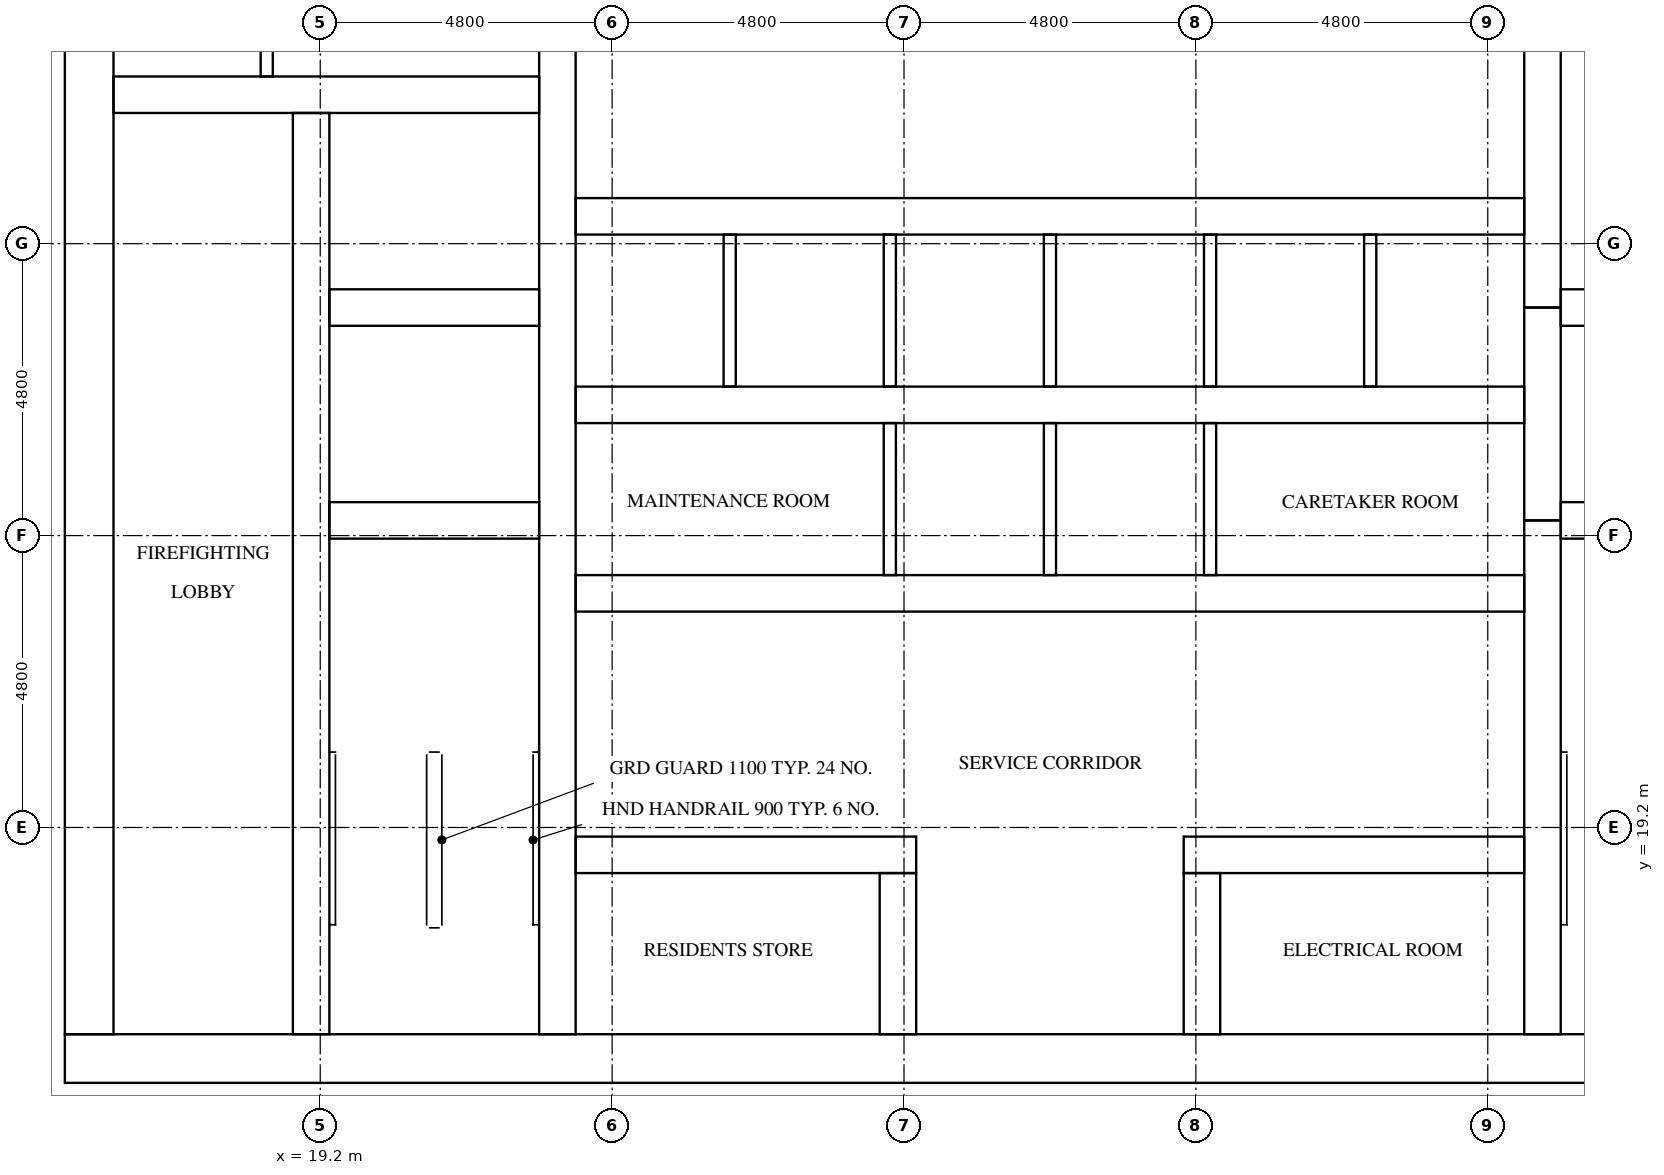
"""IFC4 building model, lengths in metres.
Left out: names, types, materials, properties, quantities, classifications, styles, units other than length and angle.
Written with IfcOpenShell. Run it as: python <this file> out.ifc"""

import sys

from ifc_helpers import new_model, si_unit, direction, frame, frame_2d, origin, place, context, subcontext, project, spatial, rectangle, extrude, element, fill, save


model = new_model("IFC4")
c1 = context("Model", 3, precision=1e-05, world=origin(), true_north=direction((0.0, 1.0)))
c2 = subcontext(c1, "Body", "Model", "MODEL_VIEW")
j1 = project(units=[si_unit("LENGTHUNIT", "METRE"), si_unit("PLANEANGLEUNIT", "RADIAN")], contexts=[c1])
p1 = place(None, origin())
s1 = spatial("IfcSite", under=j1, at=p1, CompositionType="ELEMENT")
p2 = place(p1, origin())
s2 = spatial("IfcBuilding", under=s1, at=p2, CompositionType="ELEMENT")
p3 = place(p2, frame((0.0, 0.0, 152.5)))
s3 = spatial("IfcBuildingStorey", under=s2, at=p3, CompositionType="ELEMENT", Elevation=152.5)
p4 = place(p3, frame((15.0, 15.4, 0.0), z_axis=(0.0, 0.0, 1.0), x_axis=(1.0, 0.0, 0.0)))
e1 = element("IfcWall", 1, at=p4, inside=s3, PredefinedType="SHEAR", context=c2, shape_type="SweptSolid", body=[
    extrude(rectangle(XDim=32.4, YDim=0.8, at=frame_2d((16.2, 0.0))), origin(), (0.0, 0.0, 1.0), 3.2),
])
p5 = place(p4, frame((15.3, 0.0, 0.0)))
e2 = element("IfcOpeningElement", 2, at=p5, cuts=e1, PredefinedType="OPENING", context=c2, shape_type="SweptSolid", body=[
    extrude(rectangle(XDim=1.8, YDim=2.1, at=frame_2d((0.9, 1.05))), frame((0.0, 0.41, 0.0), z_axis=(0.0, -1.0, 0.0), x_axis=(1.0, 0.0, 0.0)), (0.0, 0.0, 1.0), 0.82),
])
p6 = place(p3, frame((15.4, 15.8, 0.0), z_axis=(0.0, 0.0, 1.0), x_axis=(0.0, 1.0, 0.0)))
e3 = element("IfcWall", 3, at=p6, inside=s3, PredefinedType="SHEAR", context=c2, shape_type="SweptSolid", body=[
    extrude(rectangle(XDim=21.2, YDim=0.8, at=frame_2d((10.6, 0.0))), origin(), (0.0, 0.0, 1.0), 3.2),
])
p7 = place(p6, frame((4.96, 0.0, 0.0)))
e4 = element("IfcOpeningElement", 4, at=p7, cuts=e3, PredefinedType="OPENING", context=c2, shape_type="SweptSolid", body=[
    extrude(rectangle(XDim=1.2, YDim=2.1, at=frame_2d((0.6, 1.05))), frame((0.0, 0.41, 0.0), z_axis=(0.0, -1.0, 0.0), x_axis=(1.0, 0.0, 0.0)), (0.0, 0.0, 1.0), 0.82),
])
p8 = place(p3, frame((19.05, 15.8, 0.0), z_axis=(0.0, 0.0, 1.0), x_axis=(0.0, 1.0, 0.0)))
e5 = element("IfcWall", 5, at=p8, inside=s3, PredefinedType="SHEAR", context=c2, shape_type="SweptSolid", body=[
    extrude(rectangle(XDim=15.15, YDim=0.6, at=frame_2d((7.575, 0.0))), origin(), (0.0, 0.0, 1.0), 3.2),
])
p9 = place(p8, frame((9.65, 0.0, 0.0)))
e6 = element("IfcOpeningElement", 6, at=p9, cuts=e5, PredefinedType="OPENING", context=c2, shape_type="SweptSolid", body=[
    extrude(rectangle(XDim=1.1, YDim=2.1, at=frame_2d((0.55, 1.05))), frame((0.0, 0.31, 0.0), z_axis=(0.0, -1.0, 0.0), x_axis=(1.0, 0.0, 0.0)), (0.0, 0.0, 1.0), 0.62),
])
p10 = place(p8, frame((13.15, 0.0, 0.0)))
e7 = element("IfcOpeningElement", 7, at=p10, cuts=e5, PredefinedType="OPENING", context=c2, shape_type="SweptSolid", body=[
    extrude(rectangle(XDim=1.1, YDim=2.1, at=frame_2d((0.55, 1.05))), frame((0.0, 0.31, 0.0), z_axis=(0.0, -1.0, 0.0), x_axis=(1.0, 0.0, 0.0)), (0.0, 0.0, 1.0), 0.62),
])
p11 = place(p8, frame((0.4, 0.0, 0.0)))
e8 = element("IfcOpeningElement", 8, at=p11, cuts=e5, PredefinedType="OPENING", context=c2, shape_type="SweptSolid", body=[
    extrude(rectangle(XDim=1.2, YDim=2.1, at=frame_2d((0.6, 1.05))), frame((0.0, 0.31, 0.0), z_axis=(0.0, -1.0, 0.0), x_axis=(1.0, 0.0, 0.0)), (0.0, 0.0, 1.0), 0.62),
])
p12 = place(p3, frame((23.1, 15.8, 0.0), z_axis=(0.0, 0.0, 1.0), x_axis=(0.0, 1.0, 0.0)))
e9 = element("IfcWall", 9, at=p12, inside=s3, PredefinedType="SHEAR", context=c2, shape_type="SweptSolid", body=[
    extrude(rectangle(XDim=21.2, YDim=0.6, at=frame_2d((10.6, 0.0))), origin(), (0.0, 0.0, 1.0), 3.2),
])
p13 = place(p3, frame((39.3, 15.8, 0.0), z_axis=(0.0, 0.0, 1.0), x_axis=(0.0, 1.0, 0.0)))
e10 = element("IfcWall", 10, at=p13, inside=s3, PredefinedType="SHEAR", context=c2, shape_type="SweptSolid", body=[
    extrude(rectangle(XDim=8.45, YDim=0.6, at=frame_2d((4.225, 0.0))), origin(), (0.0, 0.0, 1.0), 3.2),
])
p14 = place(p3, frame((39.3, 24.25, 0.0), z_axis=(0.0, 0.0, 1.0), x_axis=(0.0, 1.0, 0.0)))
e11 = element("IfcWall", 11, at=p14, inside=s3, PredefinedType="SHEAR", context=c2, shape_type="SweptSolid", body=[
    extrude(rectangle(XDim=3.5, YDim=0.6, at=frame_2d((1.75, 0.0))), origin(), (0.0, 0.0, 1.0), 3.2),
])
p15 = place(p3, frame((39.3, 27.75, 0.0), z_axis=(0.0, 0.0, 1.0), x_axis=(0.0, 1.0, 0.0)))
e12 = element("IfcWall", 12, at=p15, inside=s3, PredefinedType="SHEAR", context=c2, shape_type="SweptSolid", body=[
    extrude(rectangle(XDim=9.25, YDim=0.6, at=frame_2d((4.625, 0.0))), origin(), (0.0, 0.0, 1.0), 3.2),
])
for number, where, z_axis, x_axis in (
    (13, (19.35, 24.25, 0.0), (0.0, 0.0, 1.0), (1.0, 0.0, 0.0)),
    (14, (19.35, 27.75, 0.0), (0.0, 0.0, 1.0), (1.0, 0.0, 0.0)),
):
    element("IfcWall", number, at=place(p3, frame(where, z_axis=z_axis, x_axis=x_axis)), inside=s3, PredefinedType="SHEAR", context=c2, shape_type="SweptSolid", body=[
        extrude(rectangle(XDim=3.45, YDim=0.6, at=frame_2d((1.725, 0.0))), origin(), (0.0, 0.0, 1.0), 3.2),
    ])
p16 = place(p3, frame((15.8, 31.25, 0.0), z_axis=(0.0, 0.0, 1.0), x_axis=(1.0, 0.0, 0.0)))
e15 = element("IfcWall", 15, at=p16, inside=s3, PredefinedType="SHEAR", context=c2, shape_type="SweptSolid", body=[
    extrude(rectangle(XDim=7.0, YDim=0.6, at=frame_2d((3.5, 0.0))), origin(), (0.0, 0.0, 1.0), 3.2),
])
for number, where, z_axis, x_axis in (
    (16, (39.6, 24.25, 0.0), (0.0, 0.0, 1.0), (1.0, 0.0, 0.0)),
    (17, (39.6, 27.75, 0.0), (0.0, 0.0, 1.0), (1.0, 0.0, 0.0)),
):
    element("IfcWall", number, at=place(p3, frame(where, z_axis=z_axis, x_axis=x_axis)), inside=s3, PredefinedType="SHEAR", context=c2, shape_type="SweptSolid", body=[
        extrude(rectangle(XDim=3.45, YDim=0.6, at=frame_2d((1.725, 0.0))), origin(), (0.0, 0.0, 1.0), 3.2),
    ])
p17 = place(p3, frame((23.4, 18.75, 0.0), z_axis=(0.0, 0.0, 1.0), x_axis=(1.0, 0.0, 0.0)))
e18 = element("IfcWall", 18, at=p17, inside=s3, PredefinedType="SHEAR", context=c2, shape_type="SweptSolid", body=[
    extrude(rectangle(XDim=5.6, YDim=0.6, at=frame_2d((2.8, 0.0))), origin(), (0.0, 0.0, 1.0), 3.2),
])
p18 = place(p17, frame((2.0, 0.0, 0.0)))
e19 = element("IfcOpeningElement", 19, at=p18, cuts=e18, PredefinedType="OPENING", context=c2, shape_type="SweptSolid", body=[
    extrude(rectangle(XDim=1.0, YDim=2.1, at=frame_2d((0.5, 1.05))), frame((0.0, 0.31, 0.0), z_axis=(0.0, -1.0, 0.0), x_axis=(1.0, 0.0, 0.0)), (0.0, 0.0, 1.0), 0.62),
])
p19 = place(p3, frame((33.4, 18.75, 0.0), z_axis=(0.0, 0.0, 1.0), x_axis=(1.0, 0.0, 0.0)))
e20 = element("IfcWall", 20, at=p19, inside=s3, PredefinedType="SHEAR", context=c2, shape_type="SweptSolid", body=[
    extrude(rectangle(XDim=5.6, YDim=0.6, at=frame_2d((2.8, 0.0))), origin(), (0.0, 0.0, 1.0), 3.2),
])
p20 = place(p19, frame((2.6, 0.0, 0.0)))
e21 = element("IfcOpeningElement", 21, at=p20, cuts=e20, PredefinedType="OPENING", context=c2, shape_type="SweptSolid", body=[
    extrude(rectangle(XDim=1.0, YDim=2.1, at=frame_2d((0.5, 1.05))), frame((0.0, 0.31, 0.0), z_axis=(0.0, -1.0, 0.0), x_axis=(1.0, 0.0, 0.0)), (0.0, 0.0, 1.0), 0.62),
])
p21 = place(p3, frame((23.4, 23.05, 0.0), z_axis=(0.0, 0.0, 1.0), x_axis=(1.0, 0.0, 0.0)))
e22 = element("IfcWall", 22, at=p21, inside=s3, PredefinedType="SHEAR", context=c2, shape_type="SweptSolid", body=[
    extrude(rectangle(XDim=15.6, YDim=0.6, at=frame_2d((7.8, 0.0))), origin(), (0.0, 0.0, 1.0), 3.2),
])
p22 = place(p21, frame((2.033, 0.0, 0.0)))
e23 = element("IfcOpeningElement", 23, at=p22, cuts=e22, PredefinedType="OPENING", context=c2, shape_type="SweptSolid", body=[
    extrude(rectangle(XDim=1.0, YDim=2.1, at=frame_2d((0.5, 1.05))), frame((0.0, 0.31, 0.0), z_axis=(0.0, -1.0, 0.0), x_axis=(1.0, 0.0, 0.0)), (0.0, 0.0, 1.0), 0.62),
])
p23 = place(p21, frame((12.567, 0.0, 0.0)))
e24 = element("IfcOpeningElement", 24, at=p23, cuts=e22, PredefinedType="OPENING", context=c2, shape_type="SweptSolid", body=[
    extrude(rectangle(XDim=1.0, YDim=2.1, at=frame_2d((0.5, 1.05))), frame((0.0, 0.31, 0.0), z_axis=(0.0, -1.0, 0.0), x_axis=(1.0, 0.0, 0.0)), (0.0, 0.0, 1.0), 0.62),
])
p24 = place(p3, frame((23.4, 26.15, 0.0), z_axis=(0.0, 0.0, 1.0), x_axis=(1.0, 0.0, 0.0)))
e25 = element("IfcWall", 25, at=p24, inside=s3, PredefinedType="SHEAR", context=c2, shape_type="SweptSolid", body=[
    extrude(rectangle(XDim=15.6, YDim=0.6, at=frame_2d((7.8, 0.0))), origin(), (0.0, 0.0, 1.0), 3.2),
])
p25 = place(p3, frame((23.4, 29.25, 0.0), z_axis=(0.0, 0.0, 1.0), x_axis=(1.0, 0.0, 0.0)))
e26 = element("IfcWall", 26, at=p25, inside=s3, PredefinedType="SHEAR", context=c2, shape_type="SweptSolid", body=[
    extrude(rectangle(XDim=15.6, YDim=0.6, at=frame_2d((7.8, 0.0))), origin(), (0.0, 0.0, 1.0), 3.2),
])
p26 = place(p25, frame((0.667, 0.0, 0.0)))
e27 = element("IfcOpeningElement", 27, at=p26, cuts=e26, PredefinedType="OPENING", context=c2, shape_type="SweptSolid", body=[
    extrude(rectangle(XDim=1.1, YDim=2.1, at=frame_2d((0.55, 1.05))), frame((0.0, 0.31, 0.0), z_axis=(0.0, -1.0, 0.0), x_axis=(1.0, 0.0, 0.0)), (0.0, 0.0, 1.0), 0.62),
])
p27 = place(p25, frame((3.3, 0.0, 0.0)))
e28 = element("IfcOpeningElement", 28, at=p27, cuts=e26, PredefinedType="OPENING", context=c2, shape_type="SweptSolid", body=[
    extrude(rectangle(XDim=1.1, YDim=2.1, at=frame_2d((0.55, 1.05))), frame((0.0, 0.31, 0.0), z_axis=(0.0, -1.0, 0.0), x_axis=(1.0, 0.0, 0.0)), (0.0, 0.0, 1.0), 0.62),
])
p28 = place(p25, frame((5.933, 0.0, 0.0)))
e29 = element("IfcOpeningElement", 29, at=p28, cuts=e26, PredefinedType="OPENING", context=c2, shape_type="SweptSolid", body=[
    extrude(rectangle(XDim=1.1, YDim=2.1, at=frame_2d((0.55, 1.05))), frame((0.0, 0.31, 0.0), z_axis=(0.0, -1.0, 0.0), x_axis=(1.0, 0.0, 0.0)), (0.0, 0.0, 1.0), 0.62),
])
p29 = place(p25, frame((8.567, 0.0, 0.0)))
e30 = element("IfcOpeningElement", 30, at=p29, cuts=e26, PredefinedType="OPENING", context=c2, shape_type="SweptSolid", body=[
    extrude(rectangle(XDim=1.1, YDim=2.1, at=frame_2d((0.55, 1.05))), frame((0.0, 0.31, 0.0), z_axis=(0.0, -1.0, 0.0), x_axis=(1.0, 0.0, 0.0)), (0.0, 0.0, 1.0), 0.62),
])
p30 = place(p25, frame((11.2, 0.0, 0.0)))
e31 = element("IfcOpeningElement", 31, at=p30, cuts=e26, PredefinedType="OPENING", context=c2, shape_type="SweptSolid", body=[
    extrude(rectangle(XDim=1.1, YDim=2.1, at=frame_2d((0.55, 1.05))), frame((0.0, 0.31, 0.0), z_axis=(0.0, -1.0, 0.0), x_axis=(1.0, 0.0, 0.0)), (0.0, 0.0, 1.0), 0.62),
])
p31 = place(p25, frame((13.833, 0.0, 0.0)))
e32 = element("IfcOpeningElement", 32, at=p31, cuts=e26, PredefinedType="OPENING", context=c2, shape_type="SweptSolid", body=[
    extrude(rectangle(XDim=1.1, YDim=2.1, at=frame_2d((0.55, 1.05))), frame((0.0, 0.31, 0.0), z_axis=(0.0, -1.0, 0.0), x_axis=(1.0, 0.0, 0.0)), (0.0, 0.0, 1.0), 0.62),
])
for number, where, z_axis, x_axis in (
    (33, (28.7, 15.8, 0.0), (0.0, 0.0, 1.0), (0.0, 1.0, 0.0)),
    (34, (33.7, 15.8, 0.0), (0.0, 0.0, 1.0), (0.0, 1.0, 0.0)),
):
    element("IfcWall", number, at=place(p3, frame(where, z_axis=z_axis, x_axis=x_axis)), inside=s3, PredefinedType="SHEAR", context=c2, shape_type="SweptSolid", body=[
        extrude(rectangle(XDim=2.65, YDim=0.6, at=frame_2d((1.325, 0.0))), origin(), (0.0, 0.0, 1.0), 3.2),
    ])
for number, where, z_axis, x_axis in (
    (35, (25.933, 26.45, 0.0), (0.0, 0.0, 1.0), (0.0, 1.0, 0.0)),
    (36, (28.567, 23.35, 0.0), (0.0, 0.0, 1.0), (0.0, 1.0, 0.0)),
    (37, (28.567, 26.45, 0.0), (0.0, 0.0, 1.0), (0.0, 1.0, 0.0)),
    (38, (31.2, 23.35, 0.0), (0.0, 0.0, 1.0), (0.0, 1.0, 0.0)),
    (39, (31.2, 26.45, 0.0), (0.0, 0.0, 1.0), (0.0, 1.0, 0.0)),
    (40, (33.833, 23.35, 0.0), (0.0, 0.0, 1.0), (0.0, 1.0, 0.0)),
    (41, (33.833, 26.45, 0.0), (0.0, 0.0, 1.0), (0.0, 1.0, 0.0)),
    (42, (36.467, 26.45, 0.0), (0.0, 0.0, 1.0), (0.0, 1.0, 0.0)),
):
    element("IfcWall", number, at=place(p3, frame(where, z_axis=z_axis, x_axis=x_axis)), inside=s3, PredefinedType="SOLIDWALL", context=c2, shape_type="SweptSolid", body=[
        extrude(rectangle(XDim=2.5, YDim=0.2, at=frame_2d((1.25, 0.0))), origin(), (0.0, 0.0, 1.0), 3.2),
    ])
p32 = place(p3, frame((18.32, 31.55, 0.0), z_axis=(0.0, 0.0, 1.0), x_axis=(0.0, 1.0, 0.0)))
e43 = element("IfcWall", 43, at=p32, inside=s3, PredefinedType="PARTITIONING", context=c2, shape_type="SweptSolid", body=[
    extrude(rectangle(XDim=5.45, YDim=0.2, at=frame_2d((2.725, 0.0))), origin(), (0.0, 0.0, 1.0), 3.2),
])
p33 = place(p26, origin())
e44 = element("IfcDoor", 44, at=p33, inside=s3, OperationType="DOUBLE_DOOR_SLIDING", PredefinedType="DOOR", context=c2, shape_type="SweptSolid", body=[
    extrude(rectangle(XDim=1.1, YDim=2.1, at=frame_2d((0.55, 1.05))), frame((0.0, 0.025, 0.0), z_axis=(0.0, -1.0, 0.0), x_axis=(1.0, 0.0, 0.0)), (0.0, 0.0, 1.0), 0.05),
])
fill(e27, e44)
p34 = place(p27, origin())
e45 = element("IfcDoor", 45, at=p34, inside=s3, OperationType="DOUBLE_DOOR_SLIDING", PredefinedType="DOOR", context=c2, shape_type="SweptSolid", body=[
    extrude(rectangle(XDim=1.1, YDim=2.1, at=frame_2d((0.55, 1.05))), frame((0.0, 0.025, 0.0), z_axis=(0.0, -1.0, 0.0), x_axis=(1.0, 0.0, 0.0)), (0.0, 0.0, 1.0), 0.05),
])
fill(e28, e45)
p35 = place(p28, origin())
e46 = element("IfcDoor", 46, at=p35, inside=s3, OperationType="DOUBLE_DOOR_SLIDING", PredefinedType="DOOR", context=c2, shape_type="SweptSolid", body=[
    extrude(rectangle(XDim=1.1, YDim=2.1, at=frame_2d((0.55, 1.05))), frame((0.0, 0.025, 0.0), z_axis=(0.0, -1.0, 0.0), x_axis=(1.0, 0.0, 0.0)), (0.0, 0.0, 1.0), 0.05),
])
fill(e29, e46)
p36 = place(p29, origin())
e47 = element("IfcDoor", 47, at=p36, inside=s3, OperationType="DOUBLE_DOOR_SLIDING", PredefinedType="DOOR", context=c2, shape_type="SweptSolid", body=[
    extrude(rectangle(XDim=1.1, YDim=2.1, at=frame_2d((0.55, 1.05))), frame((0.0, 0.025, 0.0), z_axis=(0.0, -1.0, 0.0), x_axis=(1.0, 0.0, 0.0)), (0.0, 0.0, 1.0), 0.05),
])
fill(e30, e47)
p37 = place(p30, origin())
e48 = element("IfcDoor", 48, at=p37, inside=s3, OperationType="DOUBLE_DOOR_SLIDING", PredefinedType="DOOR", context=c2, shape_type="SweptSolid", body=[
    extrude(rectangle(XDim=1.1, YDim=2.1, at=frame_2d((0.55, 1.05))), frame((0.0, 0.025, 0.0), z_axis=(0.0, -1.0, 0.0), x_axis=(1.0, 0.0, 0.0)), (0.0, 0.0, 1.0), 0.05),
])
fill(e31, e48)
p38 = place(p31, origin())
e49 = element("IfcDoor", 49, at=p38, inside=s3, OperationType="DOUBLE_DOOR_SLIDING", PredefinedType="DOOR", context=c2, shape_type="SweptSolid", body=[
    extrude(rectangle(XDim=1.1, YDim=2.1, at=frame_2d((0.55, 1.05))), frame((0.0, 0.025, 0.0), z_axis=(0.0, -1.0, 0.0), x_axis=(1.0, 0.0, 0.0)), (0.0, 0.0, 1.0), 0.05),
])
fill(e32, e49)
p39 = place(p9, origin())
e50 = element("IfcDoor", 50, at=p39, inside=s3, OperationType="DOUBLE_DOOR_SLIDING", PredefinedType="DOOR", context=c2, shape_type="SweptSolid", body=[
    extrude(rectangle(XDim=1.1, YDim=2.1, at=frame_2d((0.55, 1.05))), frame((0.0, 0.025, 0.0), z_axis=(0.0, -1.0, 0.0), x_axis=(1.0, 0.0, 0.0)), (0.0, 0.0, 1.0), 0.05),
])
fill(e6, e50)
p40 = place(p10, origin())
e51 = element("IfcDoor", 51, at=p40, inside=s3, OperationType="DOUBLE_DOOR_SLIDING", PredefinedType="DOOR", context=c2, shape_type="SweptSolid", body=[
    extrude(rectangle(XDim=1.1, YDim=2.1, at=frame_2d((0.55, 1.05))), frame((0.0, 0.025, 0.0), z_axis=(0.0, -1.0, 0.0), x_axis=(1.0, 0.0, 0.0)), (0.0, 0.0, 1.0), 0.05),
])
fill(e7, e51)
p41 = place(p11, frame((1.2, 0.0, 0.0), z_axis=(0.0, 0.0, 1.0), x_axis=(-1.0, 0.0, 0.0)))
e52 = element("IfcDoor", 52, at=p41, inside=s3, OperationType="SINGLE_SWING_LEFT", PredefinedType="DOOR", context=c2, shape_type="SweptSolid", body=[
    extrude(rectangle(XDim=1.2, YDim=2.1, at=frame_2d((0.6, 1.05))), frame((0.0, 0.025, 0.0), z_axis=(0.0, -1.0, 0.0), x_axis=(1.0, 0.0, 0.0)), (0.0, 0.0, 1.0), 0.05),
])
fill(e8, e52)
p42 = place(p5, frame((1.8, 0.0, 0.0), z_axis=(0.0, 0.0, 1.0), x_axis=(-1.0, 0.0, 0.0)))
e53 = element("IfcDoor", 53, at=p42, inside=s3, OperationType="DOUBLE_DOOR_SINGLE_SWING", PredefinedType="DOOR", context=c2, shape_type="SweptSolid", body=[
    extrude(rectangle(XDim=1.8, YDim=2.1, at=frame_2d((0.9, 1.05))), frame((0.0, 0.025, 0.0), z_axis=(0.0, -1.0, 0.0), x_axis=(1.0, 0.0, 0.0)), (0.0, 0.0, 1.0), 0.05),
])
fill(e2, e53)
p43 = place(p7, frame((1.2, 0.0, 0.0), z_axis=(0.0, 0.0, 1.0), x_axis=(-1.0, 0.0, 0.0)))
e54 = element("IfcDoor", 54, at=p43, inside=s3, OperationType="SINGLE_SWING_RIGHT", PredefinedType="DOOR", context=c2, shape_type="SweptSolid", body=[
    extrude(rectangle(XDim=1.2, YDim=2.1, at=frame_2d((0.6, 1.05))), frame((0.0, 0.025, 0.0), z_axis=(0.0, -1.0, 0.0), x_axis=(1.0, 0.0, 0.0)), (0.0, 0.0, 1.0), 0.05),
])
fill(e4, e54)
p44 = place(p22, frame((1.0, 0.0, 0.0), z_axis=(0.0, 0.0, 1.0), x_axis=(-1.0, 0.0, 0.0)))
e55 = element("IfcDoor", 55, at=p44, inside=s3, OperationType="SINGLE_SWING_RIGHT", PredefinedType="DOOR", context=c2, shape_type="SweptSolid", body=[
    extrude(rectangle(XDim=1.0, YDim=2.1, at=frame_2d((0.5, 1.05))), frame((0.0, 0.025, 0.0), z_axis=(0.0, -1.0, 0.0), x_axis=(1.0, 0.0, 0.0)), (0.0, 0.0, 1.0), 0.05),
])
fill(e23, e55)
p45 = place(p23, frame((1.0, 0.0, 0.0), z_axis=(0.0, 0.0, 1.0), x_axis=(-1.0, 0.0, 0.0)))
e56 = element("IfcDoor", 56, at=p45, inside=s3, OperationType="SINGLE_SWING_LEFT", PredefinedType="DOOR", context=c2, shape_type="SweptSolid", body=[
    extrude(rectangle(XDim=1.0, YDim=2.1, at=frame_2d((0.5, 1.05))), frame((0.0, 0.025, 0.0), z_axis=(0.0, -1.0, 0.0), x_axis=(1.0, 0.0, 0.0)), (0.0, 0.0, 1.0), 0.05),
])
fill(e24, e56)
p46 = place(p18, origin())
e57 = element("IfcDoor", 57, at=p46, inside=s3, OperationType="SINGLE_SWING_RIGHT", PredefinedType="DOOR", context=c2, shape_type="SweptSolid", body=[
    extrude(rectangle(XDim=1.0, YDim=2.1, at=frame_2d((0.5, 1.05))), frame((0.0, 0.025, 0.0), z_axis=(0.0, -1.0, 0.0), x_axis=(1.0, 0.0, 0.0)), (0.0, 0.0, 1.0), 0.05),
])
fill(e19, e57)
p47 = place(p20, origin())
e58 = element("IfcDoor", 58, at=p47, inside=s3, OperationType="SINGLE_SWING_LEFT", PredefinedType="DOOR", context=c2, shape_type="SweptSolid", body=[
    extrude(rectangle(XDim=1.0, YDim=2.1, at=frame_2d((0.5, 1.05))), frame((0.0, 0.025, 0.0), z_axis=(0.0, -1.0, 0.0), x_axis=(1.0, 0.0, 0.0)), (0.0, 0.0, 1.0), 0.05),
])
fill(e21, e58)
save(model, sys.argv[1])
